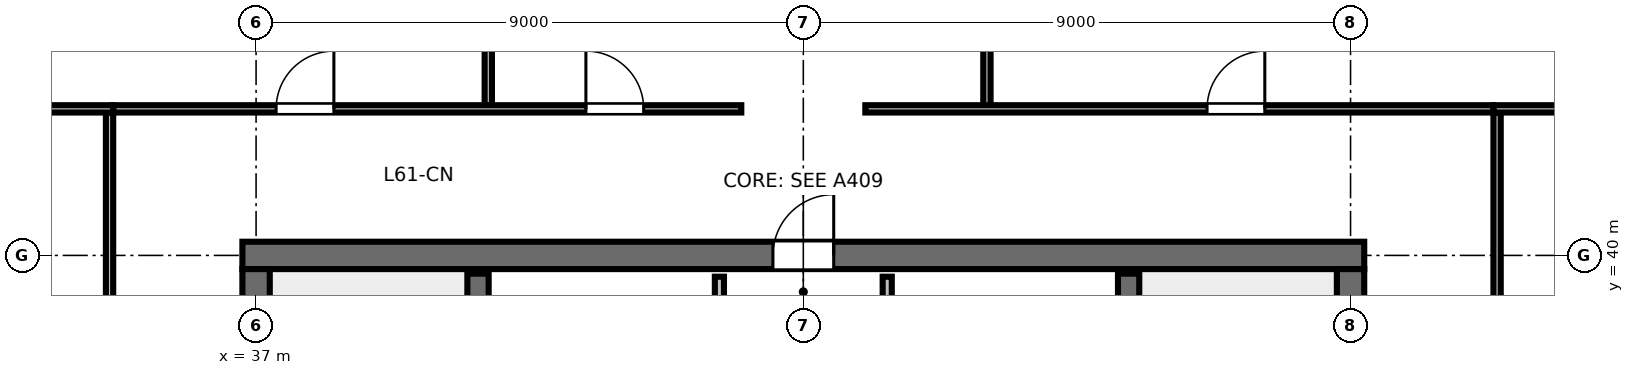
"""IFC4 building model, lengths in metres.
Left out: names, types, materials, properties, quantities, classifications, styles, units other than length and angle.
Written with IfcOpenShell. Run it as: python <this file> out.ifc"""

import sys

from ifc_helpers import new_model, si_unit, direction, frame, frame_2d, origin, place, context, subcontext, project, spatial, rectangle, extrude, element, fill, save


model = new_model("IFC4")
c1 = context("Model", 3, precision=1e-05, world=origin(), true_north=direction((0.0, 1.0)))
c2 = subcontext(c1, "Body", "Model", "MODEL_VIEW")
j1 = project(units=[si_unit("LENGTHUNIT", "METRE"), si_unit("PLANEANGLEUNIT", "RADIAN")], contexts=[c1])
p1 = place(None, origin())
s1 = spatial("IfcSite", under=j1, at=p1, CompositionType="ELEMENT")
p2 = place(p1, origin())
s2 = spatial("IfcBuilding", under=s1, at=p2, CompositionType="ELEMENT")
p3 = place(p2, frame((0.0, 0.0, 231.0)))
s3 = spatial("IfcBuildingStorey", under=s2, at=p3, CompositionType="ELEMENT", Elevation=231.0)
p4 = place(p3, frame((36.775, 40.0, 0.0), z_axis=(0.0, 0.0, 1.0), x_axis=(1.0, 0.0, 0.0)))
e1 = element("IfcWall", 1, at=p4, inside=s3, PredefinedType="SHEAR", context=c2, shape_type="SweptSolid", body=[
    extrude(rectangle(XDim=18.45, YDim=0.45, at=frame_2d((9.225, 0.0))), origin(), (0.0, 0.0, 1.0), 3.28),
])
p5 = place(p4, frame((8.725, 0.0, 0.0)))
e2 = element("IfcOpeningElement", 2, at=p5, cuts=e1, PredefinedType="OPENING", context=c2, shape_type="SweptSolid", body=[
    extrude(rectangle(XDim=1.0, YDim=2.15, at=frame_2d((0.5, 1.075))), frame((0.0, 0.235, 0.0), z_axis=(0.0, -1.0, 0.0), x_axis=(1.0, 0.0, 0.0)), (0.0, 0.0, 1.0), 0.47),
])
p6 = place(p3, frame((37.0, 24.225, 0.0), z_axis=(0.0, 0.0, 1.0), x_axis=(0.0, 1.0, 0.0)))
e3 = element("IfcWall", 3, at=p6, inside=s3, PredefinedType="SHEAR", context=c2, shape_type="SweptSolid", body=[
    extrude(rectangle(XDim=15.55, YDim=0.45, at=frame_2d((7.775, 0.0))), origin(), (0.0, 0.0, 1.0), 3.28),
])
p7 = place(p6, frame((5.3, 0.0, 0.0)))
e4 = element("IfcOpeningElement", 4, at=p7, cuts=e3, PredefinedType="OPENING", context=c2, shape_type="SweptSolid", body=[
    extrude(rectangle(XDim=1.15, YDim=2.15, at=frame_2d((0.575, 1.075))), frame((0.0, 0.235, 0.0), z_axis=(0.0, -1.0, 0.0), x_axis=(1.0, 0.0, 0.0)), (0.0, 0.0, 1.0), 0.47),
])
p8 = place(p3, frame((55.0, 24.225, 0.0), z_axis=(0.0, 0.0, 1.0), x_axis=(0.0, 1.0, 0.0)))
e5 = element("IfcWall", 5, at=p8, inside=s3, PredefinedType="SHEAR", context=c2, shape_type="SweptSolid", body=[
    extrude(rectangle(XDim=15.55, YDim=0.45, at=frame_2d((7.775, 0.0))), origin(), (0.0, 0.0, 1.0), 3.28),
])
p9 = place(p8, frame((5.3, 0.0, 0.0)))
e6 = element("IfcOpeningElement", 6, at=p9, cuts=e5, PredefinedType="OPENING", context=c2, shape_type="SweptSolid", body=[
    extrude(rectangle(XDim=1.15, YDim=2.15, at=frame_2d((0.575, 1.075))), frame((0.0, 0.235, 0.0), z_axis=(0.0, -1.0, 0.0), x_axis=(1.0, 0.0, 0.0)), (0.0, 0.0, 1.0), 0.47),
])
for number, where, z_axis, x_axis in (
    (7, (65.553, 42.218, 0.0), (0.0, 0.0, 1.0), (-0.707, 0.707, 0.0)),
    (8, (33.914, 49.685, 0.0), (0.0, 0.0, 1.0), (-0.707, -0.707, 0.0)),
):
    element("IfcWall", number, at=place(p3, frame(where, z_axis=z_axis, x_axis=x_axis)), inside=s3, PredefinedType="STANDARD", context=c2, shape_type="SweptSolid", body=[
        extrude(rectangle(XDim=10.56, YDim=0.265, at=frame_2d((5.28, 0.0))), origin(), (0.0, 0.0, 1.0), 2.343),
    ])
for number, where, z_axis, x_axis in (
    (9, (40.65, 32.0, 0.0), (0.0, 0.0, 1.0), (0.0, 1.0, 0.0)),
    (10, (51.35, 32.0, 0.0), (0.0, 0.0, 1.0), (0.0, 1.0, 0.0)),
):
    element("IfcWall", number, at=place(p3, frame(where, z_axis=z_axis, x_axis=x_axis)), inside=s3, PredefinedType="SHEAR", context=c2, shape_type="SweptSolid", body=[
        extrude(rectangle(XDim=7.7, YDim=0.35, at=frame_2d((3.85, 0.0))), origin(), (0.0, 0.0, 1.0), 3.6),
    ])
p10 = place(p3, frame((44.62, 35.72, 0.0), z_axis=(0.0, 0.0, 1.0), x_axis=(0.0, 1.0, 0.0)))
e11 = element("IfcWall", 11, at=p10, inside=s3, PredefinedType="PARTITIONING", context=c2, shape_type="SweptSolid", body=[
    extrude(rectangle(XDim=3.93, YDim=0.15, at=frame_2d((1.965, 0.0))), origin(), (0.0, 0.0, 1.0), 3.28),
])
p11 = place(p10, frame((1.5, 0.0, 0.0)))
e12 = element("IfcOpeningElement", 12, at=p11, cuts=e11, PredefinedType="OPENING", context=c2, shape_type="SweptSolid", body=[
    extrude(rectangle(XDim=0.9, YDim=2.15, at=frame_2d((0.45, 1.075))), frame((0.0, 0.085, 0.0), z_axis=(0.0, -1.0, 0.0), x_axis=(1.0, 0.0, 0.0)), (0.0, 0.0, 1.0), 0.17),
])
p12 = place(p3, frame((47.38, 35.72, 0.0), z_axis=(0.0, 0.0, 1.0), x_axis=(0.0, 1.0, 0.0)))
e13 = element("IfcWall", 13, at=p12, inside=s3, PredefinedType="PARTITIONING", context=c2, shape_type="SweptSolid", body=[
    extrude(rectangle(XDim=3.93, YDim=0.15, at=frame_2d((1.965, 0.0))), origin(), (0.0, 0.0, 1.0), 3.28),
])
p13 = place(p12, frame((1.5, 0.0, 0.0)))
e14 = element("IfcOpeningElement", 14, at=p13, cuts=e13, PredefinedType="OPENING", context=c2, shape_type="SweptSolid", body=[
    extrude(rectangle(XDim=0.9, YDim=2.15, at=frame_2d((0.45, 1.075))), frame((0.0, 0.085, 0.0), z_axis=(0.0, -1.0, 0.0), x_axis=(1.0, 0.0, 0.0)), (0.0, 0.0, 1.0), 0.17),
])
p14 = place(p3, frame((40.819, 42.41, 0.0), z_axis=(0.0, 0.0, 1.0), x_axis=(0.0, 1.0, 0.0)))
e15 = element("IfcWall", 15, at=p14, inside=s3, PredefinedType="PARTITIONING", context=c2, shape_type="SweptSolid", body=[
    extrude(rectangle(XDim=6.701, YDim=0.12, at=frame_2d((3.351, 0.0))), origin(), (0.0, 0.0, 1.0), 2.56),
])
p15 = place(p14, frame((1.4, 0.0, 0.0)))
e16 = element("IfcOpeningElement", 16, at=p15, cuts=e15, PredefinedType="OPENING", context=c2, shape_type="SweptSolid", body=[
    extrude(rectangle(XDim=0.9, YDim=2.15, at=frame_2d((0.45, 1.075))), frame((0.0, 0.07, 0.0), z_axis=(0.0, -1.0, 0.0), x_axis=(1.0, 0.0, 0.0)), (0.0, 0.0, 1.0), 0.14),
])
p16 = place(p3, frame((49.02, 42.41, 0.0), z_axis=(0.0, 0.0, 1.0), x_axis=(0.0, 1.0, 0.0)))
e17 = element("IfcWall", 17, at=p16, inside=s3, PredefinedType="PARTITIONING", context=c2, shape_type="SweptSolid", body=[
    extrude(rectangle(XDim=6.701, YDim=0.12, at=frame_2d((3.351, 0.0))), origin(), (0.0, 0.0, 1.0), 2.56),
])
p17 = place(p16, frame((1.4, 0.0, 0.0)))
e18 = element("IfcOpeningElement", 18, at=p17, cuts=e17, PredefinedType="OPENING", context=c2, shape_type="SweptSolid", body=[
    extrude(rectangle(XDim=0.9, YDim=2.15, at=frame_2d((0.45, 1.075))), frame((0.0, 0.07, 0.0), z_axis=(0.0, -1.0, 0.0), x_axis=(1.0, 0.0, 0.0)), (0.0, 0.0, 1.0), 0.14),
])
p18 = place(p3, frame((34.65, 42.41, 0.0), z_axis=(0.0, 0.0, 1.0), x_axis=(1.0, 0.0, 0.0)))
e19 = element("IfcWall", 19, at=p18, inside=s3, PredefinedType="PARTITIONING", context=c2, shape_type="SweptSolid", body=[
    extrude(rectangle(XDim=10.33, YDim=0.12, at=frame_2d((5.165, 0.0))), origin(), (0.0, 0.0, 1.0), 2.56),
])
p19 = place(p18, frame((2.679, 0.0, 0.0)))
e20 = element("IfcOpeningElement", 20, at=p19, cuts=e19, PredefinedType="OPENING", context=c2, shape_type="SweptSolid", body=[
    extrude(rectangle(XDim=0.95, YDim=2.15, at=frame_2d((0.475, 1.075))), frame((0.0, 0.07, 0.0), z_axis=(0.0, -1.0, 0.0), x_axis=(1.0, 0.0, 0.0)), (0.0, 0.0, 1.0), 0.14),
])
p20 = place(p18, frame((7.774, 0.0, 0.0)))
e21 = element("IfcOpeningElement", 21, at=p20, cuts=e19, PredefinedType="OPENING", context=c2, shape_type="SweptSolid", body=[
    extrude(rectangle(XDim=0.95, YDim=2.15, at=frame_2d((0.475, 1.075))), frame((0.0, 0.07, 0.0), z_axis=(0.0, -1.0, 0.0), x_axis=(1.0, 0.0, 0.0)), (0.0, 0.0, 1.0), 0.14),
])
p21 = place(p3, frame((47.02, 42.41, 0.0), z_axis=(0.0, 0.0, 1.0), x_axis=(1.0, 0.0, 0.0)))
e22 = element("IfcWall", 22, at=p21, inside=s3, PredefinedType="PARTITIONING", context=c2, shape_type="SweptSolid", body=[
    extrude(rectangle(XDim=10.33, YDim=0.12, at=frame_2d((5.165, 0.0))), origin(), (0.0, 0.0, 1.0), 2.56),
])
p22 = place(p21, frame((5.62, 0.0, 0.0)))
e23 = element("IfcOpeningElement", 23, at=p22, cuts=e22, PredefinedType="OPENING", context=c2, shape_type="SweptSolid", body=[
    extrude(rectangle(XDim=0.95, YDim=2.15, at=frame_2d((0.475, 1.075))), frame((0.0, 0.07, 0.0), z_axis=(0.0, -1.0, 0.0), x_axis=(1.0, 0.0, 0.0)), (0.0, 0.0, 1.0), 0.14),
])
p23 = place(p3, frame((34.59, 21.65, 0.0), z_axis=(0.0, 0.0, 1.0), x_axis=(0.0, 1.0, 0.0)))
e24 = element("IfcWall", 24, at=p23, inside=s3, PredefinedType="PARTITIONING", context=c2, shape_type="SweptSolid", body=[
    extrude(rectangle(XDim=20.7, YDim=0.12, at=frame_2d((10.35, 0.0))), origin(), (0.0, 0.0, 1.0), 2.56),
])
p24 = place(p23, frame((3.682, 0.0, 0.0)))
e25 = element("IfcOpeningElement", 25, at=p24, cuts=e24, PredefinedType="OPENING", context=c2, shape_type="SweptSolid", body=[
    extrude(rectangle(XDim=0.95, YDim=2.15, at=frame_2d((0.475, 1.075))), frame((0.0, 0.07, 0.0), z_axis=(0.0, -1.0, 0.0), x_axis=(1.0, 0.0, 0.0)), (0.0, 0.0, 1.0), 0.14),
])
p25 = place(p23, frame((13.832, 0.0, 0.0)))
e26 = element("IfcOpeningElement", 26, at=p25, cuts=e24, PredefinedType="OPENING", context=c2, shape_type="SweptSolid", body=[
    extrude(rectangle(XDim=0.95, YDim=2.15, at=frame_2d((0.475, 1.075))), frame((0.0, 0.07, 0.0), z_axis=(0.0, -1.0, 0.0), x_axis=(1.0, 0.0, 0.0)), (0.0, 0.0, 1.0), 0.14),
])
p26 = place(p3, frame((57.41, 21.65, 0.0), z_axis=(0.0, 0.0, 1.0), x_axis=(0.0, 1.0, 0.0)))
e27 = element("IfcWall", 27, at=p26, inside=s3, PredefinedType="PARTITIONING", context=c2, shape_type="SweptSolid", body=[
    extrude(rectangle(XDim=20.7, YDim=0.12, at=frame_2d((10.35, 0.0))), origin(), (0.0, 0.0, 1.0), 2.56),
])
p27 = place(p26, frame((2.799, 0.0, 0.0)))
e28 = element("IfcOpeningElement", 28, at=p27, cuts=e27, PredefinedType="OPENING", context=c2, shape_type="SweptSolid", body=[
    extrude(rectangle(XDim=0.95, YDim=2.15, at=frame_2d((0.475, 1.075))), frame((0.0, 0.07, 0.0), z_axis=(0.0, -1.0, 0.0), x_axis=(1.0, 0.0, 0.0)), (0.0, 0.0, 1.0), 0.14),
])
p28 = place(p26, frame((8.187, 0.0, 0.0)))
e29 = element("IfcOpeningElement", 29, at=p28, cuts=e27, PredefinedType="OPENING", context=c2, shape_type="SweptSolid", body=[
    extrude(rectangle(XDim=0.95, YDim=2.15, at=frame_2d((0.475, 1.075))), frame((0.0, 0.07, 0.0), z_axis=(0.0, -1.0, 0.0), x_axis=(1.0, 0.0, 0.0)), (0.0, 0.0, 1.0), 0.14),
])
p29 = place(p26, frame((15.263, 0.0, 0.0)))
e30 = element("IfcOpeningElement", 30, at=p29, cuts=e27, PredefinedType="OPENING", context=c2, shape_type="SweptSolid", body=[
    extrude(rectangle(XDim=0.95, YDim=2.15, at=frame_2d((0.475, 1.075))), frame((0.0, 0.07, 0.0), z_axis=(0.0, -1.0, 0.0), x_axis=(1.0, 0.0, 0.0)), (0.0, 0.0, 1.0), 0.14),
])
for number, where, z_axis, x_axis in (
    (31, (34.65, 42.41, 0.0), (0.0, 0.0, 1.0), (-1.0, 0.0, 0.0)),
    (32, (57.35, 42.41, 0.0), (0.0, 0.0, 1.0), (1.0, 0.0, 0.0)),
):
    element("IfcWall", number, at=place(p3, frame(where, z_axis=z_axis, x_axis=x_axis)), inside=s3, PredefinedType="PARTITIONING", context=c2, shape_type="SweptSolid", body=[
        extrude(rectangle(XDim=7.629, YDim=0.12, at=frame_2d((3.814, 0.0))), origin(), (0.0, 0.0, 1.0), 2.56),
    ])
p30 = place(p5, origin())
e33 = element("IfcDoor", 33, at=p30, inside=s3, OperationType="SINGLE_SWING_RIGHT", PredefinedType="DOOR", context=c2, shape_type="SweptSolid", body=[
    extrude(rectangle(XDim=1.0, YDim=2.15, at=frame_2d((0.5, 1.075))), frame((0.0, 0.025, 0.0), z_axis=(0.0, -1.0, 0.0), x_axis=(1.0, 0.0, 0.0)), (0.0, 0.0, 1.0), 0.05),
])
fill(e2, e33)
p31 = place(p19, origin())
e34 = element("IfcDoor", 34, at=p31, inside=s3, OperationType="SINGLE_SWING_RIGHT", PredefinedType="DOOR", context=c2, shape_type="SweptSolid", body=[
    extrude(rectangle(XDim=0.95, YDim=2.15, at=frame_2d((0.475, 1.075))), frame((0.0, 0.025, 0.0), z_axis=(0.0, -1.0, 0.0), x_axis=(1.0, 0.0, 0.0)), (0.0, 0.0, 1.0), 0.05),
])
fill(e20, e34)
p32 = place(p20, origin())
e35 = element("IfcDoor", 35, at=p32, inside=s3, OperationType="SINGLE_SWING_LEFT", PredefinedType="DOOR", context=c2, shape_type="SweptSolid", body=[
    extrude(rectangle(XDim=0.95, YDim=2.15, at=frame_2d((0.475, 1.075))), frame((0.0, 0.025, 0.0), z_axis=(0.0, -1.0, 0.0), x_axis=(1.0, 0.0, 0.0)), (0.0, 0.0, 1.0), 0.05),
])
fill(e21, e35)
p33 = place(p22, origin())
e36 = element("IfcDoor", 36, at=p33, inside=s3, OperationType="SINGLE_SWING_RIGHT", PredefinedType="DOOR", context=c2, shape_type="SweptSolid", body=[
    extrude(rectangle(XDim=0.95, YDim=2.15, at=frame_2d((0.475, 1.075))), frame((0.0, 0.025, 0.0), z_axis=(0.0, -1.0, 0.0), x_axis=(1.0, 0.0, 0.0)), (0.0, 0.0, 1.0), 0.05),
])
fill(e23, e36)
save(model, sys.argv[1])
